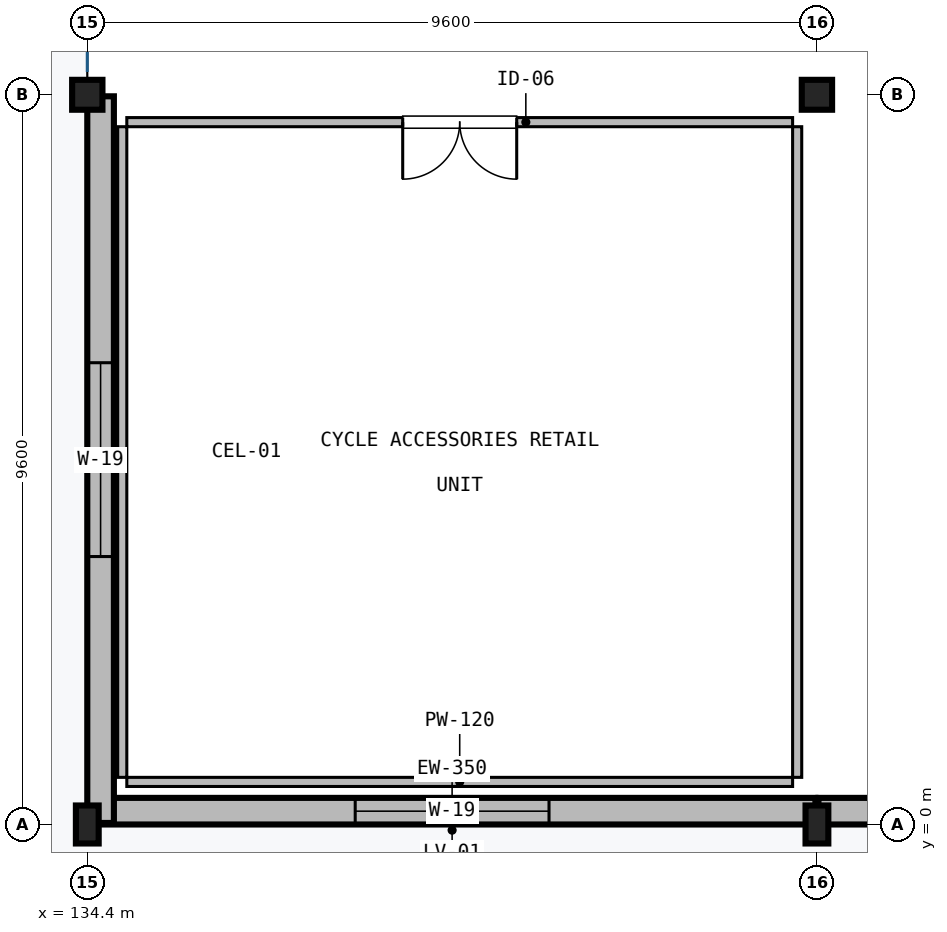
"""IFC4 building model, lengths in metres.
Left out: names, types, materials, properties, quantities, classifications, styles, units other than length and angle.
Written with IfcOpenShell. Run it as: python <this file> out.ifc"""

import sys

from ifc_helpers import new_model, si_unit, direction, frame, frame_2d, origin, origin_2d, place, context, subcontext, project, spatial, rectangle, i_section, extrude, element, fill, save


model = new_model("IFC4")
c1 = context("Model", 3, precision=1e-05, world=origin(), true_north=direction((0.0, 1.0)))
c2 = subcontext(c1, "Body", "Model", "MODEL_VIEW")
j1 = project(units=[si_unit("LENGTHUNIT", "METRE"), si_unit("PLANEANGLEUNIT", "RADIAN")], contexts=[c1])
p1 = place(None, origin())
s1 = spatial("IfcSite", under=j1, at=p1, CompositionType="ELEMENT")
p2 = place(p1, origin())
s2 = spatial("IfcBuilding", under=s1, at=p2, CompositionType="ELEMENT")
p3 = place(p2, origin())
s3 = spatial("IfcBuildingStorey", under=s2, at=p3, CompositionType="ELEMENT", Elevation=0.0)
p4 = place(p3, frame((134.4, 0.0, -0.36), z_axis=(0.0, 0.0, 1.0), x_axis=(1.0, 0.0, 0.0)))
e1 = element("IfcColumn", 1, at=p4, inside=s3, PredefinedType="COLUMN", context=c2, shape_type="SweptSolid", body=[
    extrude(i_section(OverallWidth=0.3, OverallDepth=0.5, WebThickness=0.014, FlangeThickness=0.028, FilletRadius=0.027, at=origin_2d()), origin(), (0.0, 0.0, 1.0), 6.11),
])
p5 = place(p3, frame((134.4, 9.6, -0.36), z_axis=(0.0, 0.0, 1.0), x_axis=(1.0, 0.0, 0.0)))
e2 = element("IfcColumn", 2, at=p5, inside=s3, PredefinedType="COLUMN", context=c2, shape_type="SweptSolid", body=[
    extrude(i_section(OverallWidth=0.399, OverallDepth=0.394, WebThickness=0.023, FlangeThickness=0.037, FilletRadius=0.015, at=origin_2d()), origin(), (0.0, 0.0, 1.0), 6.11),
])
p6 = place(p3, frame((144.0, 0.0, -0.36), z_axis=(0.0, 0.0, 1.0), x_axis=(1.0, 0.0, 0.0)))
e3 = element("IfcColumn", 3, at=p6, inside=s3, PredefinedType="COLUMN", context=c2, shape_type="SweptSolid", body=[
    extrude(i_section(OverallWidth=0.3, OverallDepth=0.5, WebThickness=0.014, FlangeThickness=0.028, FilletRadius=0.027, at=origin_2d()), origin(), (0.0, 0.0, 1.0), 6.11),
])
p7 = place(p3, frame((144.0, 9.6, -0.36), z_axis=(0.0, 0.0, 1.0), x_axis=(1.0, 0.0, 0.0)))
e4 = element("IfcColumn", 4, at=p7, inside=s3, PredefinedType="COLUMN", context=c2, shape_type="SweptSolid", body=[
    extrude(i_section(OverallWidth=0.399, OverallDepth=0.394, WebThickness=0.023, FlangeThickness=0.037, FilletRadius=0.015, at=origin_2d()), origin(), (0.0, 0.0, 1.0), 6.11),
])
p8 = place(p3, frame((143.98, 0.175, 0.0), z_axis=(0.0, 0.0, 1.0), x_axis=(-1.0, 0.0, 0.0)))
e5 = element("IfcWall", 5, at=p8, inside=s3, PredefinedType="SOLIDWALL", context=c2, shape_type="SweptSolid", body=[
    extrude(rectangle(XDim=9.56, YDim=0.35, at=frame_2d((4.78, 0.0))), origin(), (0.0, 0.0, 1.0), 5.4),
])
p9 = place(p8, frame((3.505, 0.0, 0.9)))
e6 = element("IfcOpeningElement", 6, at=p9, cuts=e5, PredefinedType="OPENING", context=c2, shape_type="SweptSolid", body=[
    extrude(rectangle(XDim=2.55, YDim=1.8, at=frame_2d((1.275, 0.9))), frame((0.0, 0.185, 0.0), z_axis=(0.0, -1.0, 0.0), x_axis=(1.0, 0.0, 0.0)), (0.0, 0.0, 1.0), 0.37),
])
p10 = place(p3, frame((134.575, 0.02, 0.0), z_axis=(0.0, 0.0, 1.0), x_axis=(0.0, 1.0, 0.0)))
e7 = element("IfcWall", 7, at=p10, inside=s3, PredefinedType="SOLIDWALL", context=c2, shape_type="SweptSolid", body=[
    extrude(rectangle(XDim=9.56, YDim=0.35, at=frame_2d((4.78, 0.0))), origin(), (0.0, 0.0, 1.0), 5.217),
])
p11 = place(p10, frame((3.505, 0.0, 0.9)))
e8 = element("IfcOpeningElement", 8, at=p11, cuts=e7, PredefinedType="OPENING", context=c2, shape_type="SweptSolid", body=[
    extrude(rectangle(XDim=2.55, YDim=1.8, at=frame_2d((1.275, 0.9))), frame((0.0, 0.185, 0.0), z_axis=(0.0, -1.0, 0.0), x_axis=(1.0, 0.0, 0.0)), (0.0, 0.0, 1.0), 0.37),
])
p12 = place(p3, frame((153.58, 0.175, 0.0), z_axis=(0.0, 0.0, 1.0), x_axis=(-1.0, 0.0, 0.0)))
e9 = element("IfcWall", 9, at=p12, inside=s3, PredefinedType="SOLIDWALL", context=c2, shape_type="SweptSolid", body=[
    extrude(rectangle(XDim=9.56, YDim=0.35, at=frame_2d((4.78, 0.0))), origin(), (0.0, 0.0, 1.0), 5.4),
])
p13 = place(p12, frame((3.73, 0.0, 0.0)))
e10 = element("IfcOpeningElement", 10, at=p13, cuts=e9, PredefinedType="OPENING", context=c2, shape_type="SweptSolid", body=[
    extrude(rectangle(XDim=2.1, YDim=2.35, at=frame_2d((1.05, 1.175))), frame((0.0, 0.185, 0.0), z_axis=(0.0, -1.0, 0.0), x_axis=(1.0, 0.0, 0.0)), (0.0, 0.0, 1.0), 0.37),
])
p14 = place(p3, frame((143.68, 0.56, 0.0), z_axis=(0.0, 0.0, 1.0), x_axis=(-1.0, 0.0, 0.0)))
e11 = element("IfcWall", 11, at=p14, inside=s3, PredefinedType="PARTITIONING", context=c2, shape_type="SweptSolid", body=[
    extrude(rectangle(XDim=8.76, YDim=0.12, at=frame_2d((4.38, 0.0))), origin(), (0.0, 0.0, 1.0), 5.39),
])
p15 = place(p3, frame((134.92, 9.24, 0.0), z_axis=(0.0, 0.0, 1.0), x_axis=(1.0, 0.0, 0.0)))
e12 = element("IfcWall", 12, at=p15, inside=s3, PredefinedType="PARTITIONING", context=c2, shape_type="SweptSolid", body=[
    extrude(rectangle(XDim=8.76, YDim=0.12, at=frame_2d((4.38, 0.0))), origin(), (0.0, 0.0, 1.0), 5.39),
])
p16 = place(p15, frame((3.63, 0.0, 0.0)))
e13 = element("IfcOpeningElement", 13, at=p16, cuts=e12, PredefinedType="OPENING", context=c2, shape_type="SweptSolid", body=[
    extrude(rectangle(XDim=1.5, YDim=2.25, at=frame_2d((0.75, 1.125))), frame((0.0, 0.07, 0.0), z_axis=(0.0, -1.0, 0.0), x_axis=(1.0, 0.0, 0.0)), (0.0, 0.0, 1.0), 0.14),
])
for number, where, z_axis, x_axis in (
    (14, (134.86, 0.62, 0.0), (0.0, 0.0, 1.0), (0.0, 1.0, 0.0)),
    (15, (143.74, 9.18, 0.0), (0.0, 0.0, 1.0), (0.0, -1.0, 0.0)),
):
    element("IfcWall", number, at=place(p3, frame(where, z_axis=z_axis, x_axis=x_axis)), inside=s3, PredefinedType="PARTITIONING", context=c2, shape_type="SweptSolid", body=[
        extrude(rectangle(XDim=8.56, YDim=0.12, at=frame_2d((4.28, 0.0))), origin(), (0.0, 0.0, 1.0), 5.39),
    ])
p17 = place(p9, origin())
e16 = element("IfcWindow", 16, at=p17, inside=s3, PartitioningType="SINGLE_PANEL", PredefinedType="WINDOW", context=c2, shape_type="SweptSolid", body=[
    extrude(rectangle(XDim=2.55, YDim=1.8, at=frame_2d((1.275, 0.9))), frame((0.0, 0.03, 0.0), z_axis=(0.0, -1.0, 0.0), x_axis=(1.0, 0.0, 0.0)), (0.0, 0.0, 1.0), 0.06),
])
fill(e6, e16)
p18 = place(p11, origin())
e17 = element("IfcWindow", 17, at=p18, inside=s3, PartitioningType="SINGLE_PANEL", PredefinedType="WINDOW", context=c2, shape_type="SweptSolid", body=[
    extrude(rectangle(XDim=2.55, YDim=1.8, at=frame_2d((1.275, 0.9))), frame((0.0, 0.03, 0.0), z_axis=(0.0, -1.0, 0.0), x_axis=(1.0, 0.0, 0.0)), (0.0, 0.0, 1.0), 0.06),
])
fill(e8, e17)
p19 = place(p16, frame((1.5, 0.0, 0.0), z_axis=(0.0, 0.0, 1.0), x_axis=(-1.0, 0.0, 0.0)))
e18 = element("IfcDoor", 18, at=p19, inside=s3, OperationType="DOUBLE_DOOR_SINGLE_SWING", PredefinedType="DOOR", context=c2, shape_type="SweptSolid", body=[
    extrude(rectangle(XDim=1.5, YDim=2.25, at=frame_2d((0.75, 1.125))), frame((0.0, 0.025, 0.0), z_axis=(0.0, -1.0, 0.0), x_axis=(1.0, 0.0, 0.0)), (0.0, 0.0, 1.0), 0.05),
])
fill(e13, e18)
save(model, sys.argv[1])
